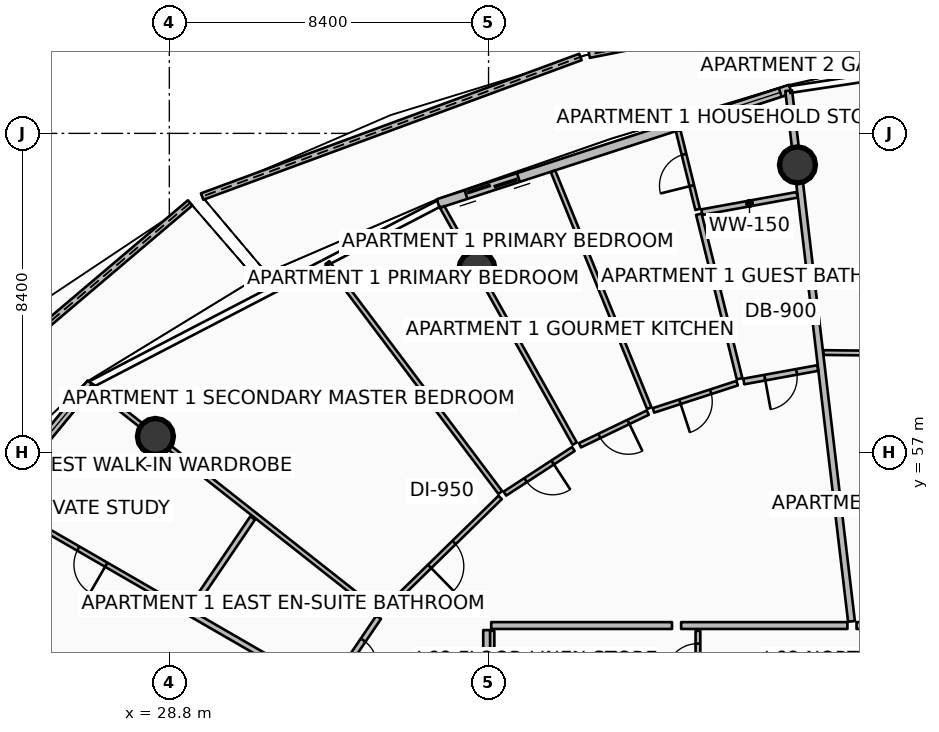
"""IFC4 building model, lengths in metres.
Left out: names, types, materials, properties, quantities, classifications, styles, units other than length and angle.
Written with IfcOpenShell. Run it as: python <this file> out.ifc"""

import sys

from ifc_helpers import new_model, si_unit, direction, frame, frame_2d, origin, origin_2d, place, context, subcontext, project, spatial, polyline, rectangle, circle, outline, extrude, element, fill, save


model = new_model("IFC4")
c1 = context("Model", 3, precision=1e-05, world=origin(), true_north=direction((0.0, 1.0)))
c2 = subcontext(c1, "Body", "Model", "MODEL_VIEW")
j1 = project(units=[si_unit("LENGTHUNIT", "METRE"), si_unit("PLANEANGLEUNIT", "RADIAN")], contexts=[c1])
p1 = place(None, origin())
s1 = spatial("IfcSite", under=j1, at=p1, CompositionType="ELEMENT")
p2 = place(p1, origin())
s2 = spatial("IfcBuilding", under=s1, at=p2, CompositionType="ELEMENT")
p3 = place(p2, frame((0.0, 0.0, 271.35)))
s3 = spatial("IfcBuildingStorey", under=s2, at=p3, CompositionType="ELEMENT", Elevation=271.35)
for number, where, z_axis, x_axis in (
    (1, (45.329, 64.571, 0.0), (0.0, 0.0, 1.0), (1.0, 0.0, 0.0)),
    (2, (36.895, 61.83, 0.0), (0.0, 0.0, 1.0), (1.0, 0.0, 0.0)),
    (3, (28.434, 57.425, 0.0), (0.0, 0.0, 1.0), (1.0, 0.0, 0.0)),
):
    element("IfcColumn", number, at=place(p3, frame(where, z_axis=z_axis, x_axis=x_axis)), inside=s3, PredefinedType="COLUMN", context=c2, shape_type="SweptSolid", body=[
        extrude(circle(Radius=0.475, at=origin_2d()), origin(), (0.0, 0.0, 1.0), 3.59),
    ])
p4 = place(p3, frame((49.994, 69.486, 0.0), z_axis=(0.0, 0.0, 1.0), x_axis=(-0.980919619001, -0.194413736807, 0.0)))
e4 = element("IfcWall", 4, at=p4, inside=s3, PredefinedType="PARAPET", context=c2, shape_type="SweptSolid", body=[
    extrude(outline(polyline([(0.0, 0.0), (10.344, 0.0), (10.344, 1.632), (5.172, 1.418), (0.0, 1.233), (0.0, 0.0)])), frame((0.0, 0.09, 0.0), z_axis=(0.0, -1.0, 0.0), x_axis=(1.0, 0.0, 0.0)), (0.0, 0.0, 1.0), 0.18),
])
p5 = place(p3, frame((39.618, 67.41, 0.0), z_axis=(0.0, 0.0, 1.0), x_axis=(-0.938191788678, -0.346115829828, 0.0)))
e5 = element("IfcWall", 5, at=p5, inside=s3, PredefinedType="PARAPET", context=c2, shape_type="SweptSolid", body=[
    extrude(outline(polyline([(0.0, 0.0), (10.611, 0.0), (10.611, 1.86), (5.305, 1.798), (0.0, 1.632), (0.0, 0.0)])), frame((0.0, 0.09, 0.0), z_axis=(0.0, -1.0, 0.0), x_axis=(1.0, 0.0, 0.0)), (0.0, 0.0, 1.0), 0.18),
])
p6 = place(p3, frame((29.348, 63.571, 0.0), z_axis=(0.0, 0.0, 1.0), x_axis=(-0.762735629532, -0.646710413896, 0.0)))
e6 = element("IfcWall", 6, at=p6, inside=s3, PredefinedType="PARAPET", context=c2, shape_type="SweptSolid", body=[
    extrude(outline(polyline([(0.0, 0.0), (11.535, 0.0), (11.535, 1.632), (5.768, 1.798), (0.0, 1.86), (0.0, 0.0)])), frame((0.0, 0.09, 0.0), z_axis=(0.0, -1.0, 0.0), x_axis=(1.0, 0.0, 0.0)), (0.0, 0.0, 1.0), 0.18),
])
p7 = place(p3, frame((45.142, 66.564, 0.0), z_axis=(0.0, 0.0, 1.0), x_axis=(-0.951055974609, -0.309018661507, 0.0)))
e7 = element("IfcWall", 7, at=p7, inside=s3, PredefinedType="SOLIDWALL", context=c2, shape_type="SweptSolid", body=[
    extrude(rectangle(XDim=9.745, YDim=0.24, at=frame_2d((4.873, 0.0))), origin(), (0.0, 0.0, 1.0), 2.54),
])
p8 = place(p7, frame((7.525, 0.0, 0.0)))
e8 = element("IfcOpeningElement", 8, at=p8, cuts=e7, PredefinedType="OPENING", context=c2, shape_type="SweptSolid", body=[
    extrude(rectangle(XDim=1.45, YDim=2.15, at=frame_2d((0.725, 1.075))), frame((0.0, 0.13, 0.0), z_axis=(0.0, -1.0, 0.0), x_axis=(1.0, 0.0, 0.0)), (0.0, 0.0, 1.0), 0.26),
])
p9 = place(p7, frame((0.28, 0.0, 0.65)))
e9 = element("IfcOpeningElement", 9, at=p9, cuts=e7, PredefinedType="OPENING", context=c2, shape_type="SweptSolid", body=[
    extrude(rectangle(XDim=1.6, YDim=1.5, at=frame_2d((0.8, 0.75))), frame((0.0, 0.13, 0.0), z_axis=(0.0, -1.0, 0.0), x_axis=(1.0, 0.0, 0.0)), (0.0, 0.0, 1.0), 0.26),
])
p10 = place(p3, frame((26.742, 58.822, 0.0), z_axis=(0.0, 0.0, 1.0), x_axis=(-0.636680093065, -0.771128043255, 0.0)))
e10 = element("IfcWall", 10, at=p10, inside=s3, PredefinedType="SOLIDWALL", context=c2, shape_type="SweptSolid", body=[
    extrude(rectangle(XDim=11.438, YDim=0.24, at=frame_2d((5.719, 0.0))), origin(), (0.0, 0.0, 1.0), 2.54),
])
p11 = place(p10, frame((9.218, 0.0, 0.0)))
e11 = element("IfcOpeningElement", 11, at=p11, cuts=e10, PredefinedType="OPENING", context=c2, shape_type="SweptSolid", body=[
    extrude(rectangle(XDim=1.45, YDim=2.15, at=frame_2d((0.725, 1.075))), frame((0.0, 0.13, 0.0), z_axis=(0.0, -1.0, 0.0), x_axis=(1.0, 0.0, 0.0)), (0.0, 0.0, 1.0), 0.26),
])
p12 = place(p10, frame((0.28, 0.0, 0.65)))
e12 = element("IfcOpeningElement", 12, at=p12, cuts=e10, PredefinedType="OPENING", context=c2, shape_type="SweptSolid", body=[
    extrude(rectangle(XDim=1.6, YDim=1.5, at=frame_2d((0.8, 0.75))), frame((0.0, 0.13, 0.0), z_axis=(0.0, -1.0, 0.0), x_axis=(1.0, 0.0, 0.0)), (0.0, 0.0, 1.0), 0.26),
])
p13 = place(p3, frame((37.29, 50.77, 0.0), z_axis=(0.0, 0.0, 1.0), x_axis=(0.0, 1.0, 0.0)))
e13 = element("IfcWall", 13, at=p13, inside=s3, PredefinedType="PARTITIONING", context=c2, shape_type="SweptSolid", body=[
    extrude(rectangle(XDim=1.54, YDim=0.125, at=frame_2d((0.77, 0.0))), origin(), (0.0, 0.0, 1.0), 3.03),
])
p14 = place(p3, frame((42.71, 50.79, 0.0), z_axis=(0.0, 0.0, 1.0), x_axis=(0.0, 1.0, 0.0)))
e14 = element("IfcWall", 14, at=p14, inside=s3, PredefinedType="PARTITIONING", context=c2, shape_type="SweptSolid", body=[
    extrude(rectangle(XDim=1.52, YDim=0.125, at=frame_2d((0.76, 0.0))), origin(), (0.0, 0.0, 1.0), 2.957),
])
p15 = place(p14, frame((0.335, 0.0, 0.0)))
e15 = element("IfcOpeningElement", 15, at=p15, cuts=e14, PredefinedType="OPENING", context=c2, shape_type="SweptSolid", body=[
    extrude(rectangle(XDim=0.85, YDim=2.06, at=frame_2d((0.425, 1.03))), frame((0.0, 0.073, 0.0), z_axis=(0.0, -1.0, 0.0), x_axis=(1.0, 0.0, 0.0)), (0.0, 0.0, 1.0), 0.145),
])
p16 = place(p3, frame((46.75, 52.559, 0.0), z_axis=(0.0, 0.0, 1.0), x_axis=(-0.117540318076, 0.993068111273, 0.0)))
e16 = element("IfcWall", 16, at=p16, inside=s3, PredefinedType="PARTITIONING", context=c2, shape_type="SweptSolid", body=[
    extrude(rectangle(XDim=14.062, YDim=0.18, at=frame_2d((7.031, 0.0))), origin(), (0.0, 0.0, 1.0), 2.957),
])
p17 = place(p3, frame((46.643, 52.45, 0.0), z_axis=(0.0, 0.0, 1.0), x_axis=(-1.0, 0.0, 0.0)))
e17 = element("IfcWall", 17, at=p17, inside=s3, PredefinedType="PARTITIONING", context=c2, shape_type="SweptSolid", body=[
    extrude(rectangle(XDim=4.376, YDim=0.18, at=frame_2d((2.188, 0.0))), origin(), (0.0, 0.0, 1.0), 2.957),
])
p18 = place(p3, frame((45.861, 59.226, 0.0), z_axis=(0.0, 0.0, 1.0), x_axis=(-0.983812554945, -0.179200604723, 0.0)))
e18 = element("IfcWall", 18, at=p18, inside=s3, PredefinedType="PARTITIONING", context=c2, shape_type="SweptSolid", body=[
    extrude(rectangle(XDim=1.977, YDim=0.15, at=frame_2d((0.988, 0.0))), origin(), (0.0, 0.0, 1.0), 2.957),
])
p19 = place(p18, frame((0.563, 0.0, 0.0)))
e19 = element("IfcOpeningElement", 19, at=p19, cuts=e18, PredefinedType="OPENING", context=c2, shape_type="SweptSolid", body=[
    extrude(rectangle(XDim=0.85, YDim=2.06, at=frame_2d((0.425, 1.03))), frame((0.0, 0.085, 0.0), z_axis=(0.0, -1.0, 0.0), x_axis=(1.0, 0.0, 0.0)), (0.0, 0.0, 1.0), 0.17),
])
p20 = place(p3, frame((45.321, 63.784, 0.0), z_axis=(0.0, 0.0, 1.0), x_axis=(-0.983788616277, -0.179331978422, 0.0)))
e20 = element("IfcWall", 20, at=p20, inside=s3, PredefinedType="PARTITIONING", context=c2, shape_type="SweptSolid", body=[
    extrude(rectangle(XDim=2.55, YDim=0.15, at=frame_2d((1.275, 0.0))), origin(), (0.0, 0.0, 1.0), 2.957),
])
p21 = place(p3, frame((43.806, 58.943, 0.0), z_axis=(0.0, 0.0, 1.0), x_axis=(-0.240319531841, 0.970693835674, 0.0)))
e21 = element("IfcWall", 21, at=p21, inside=s3, PredefinedType="PARTITIONING", context=c2, shape_type="SweptSolid", body=[
    extrude(rectangle(XDim=4.46, YDim=0.15, at=frame_2d((2.23, 0.0))), origin(), (0.0, 0.0, 1.0), 3.03),
])
p22 = place(p3, frame((42.703, 63.398, 0.0), z_axis=(0.0, 0.0, 1.0), x_axis=(-0.240385432392, 0.970677517971, 0.0)))
e22 = element("IfcWall", 22, at=p22, inside=s3, PredefinedType="PARTITIONING", context=c2, shape_type="SweptSolid", body=[
    extrude(rectangle(XDim=2.138, YDim=0.125, at=frame_2d((1.069, 0.0))), origin(), (0.0, 0.0, 1.0), 3.03),
])
p23 = place(p22, frame((0.644, 0.0, 0.0)))
e23 = element("IfcOpeningElement", 23, at=p23, cuts=e22, PredefinedType="OPENING", context=c2, shape_type="SweptSolid", body=[
    extrude(rectangle(XDim=0.85, YDim=2.06, at=frame_2d((0.425, 1.03))), frame((0.0, 0.073, 0.0), z_axis=(0.0, -1.0, 0.0), x_axis=(1.0, 0.0, 0.0)), (0.0, 0.0, 1.0), 0.145),
])
p24 = place(p3, frame((41.429, 58.17, 0.0), z_axis=(0.0, 0.0, 1.0), x_axis=(-0.376458801215, 0.926433360252, 0.0)))
e24 = element("IfcWall", 24, at=p24, inside=s3, PredefinedType="PARTITIONING", context=c2, shape_type="SweptSolid", body=[
    extrude(rectangle(XDim=6.728, YDim=0.125, at=frame_2d((3.364, 0.0))), origin(), (0.0, 0.0, 1.0), 3.03),
])
p25 = place(p3, frame((43.742, 58.827, 0.0), z_axis=(0.0, 0.0, 1.0), x_axis=(-0.950997650668, -0.309198105466, 0.0)))
e25 = element("IfcWall", 25, at=p25, inside=s3, PredefinedType="PARTITIONING", context=c2, shape_type="SweptSolid", body=[
    extrude(rectangle(XDim=2.316, YDim=0.125, at=frame_2d((1.158, 0.0))), origin(), (0.0, 0.0, 1.0), 3.03),
])
p26 = place(p25, frame((0.733, 0.0, 0.0)))
e26 = element("IfcOpeningElement", 26, at=p26, cuts=e25, PredefinedType="OPENING", context=c2, shape_type="SweptSolid", body=[
    extrude(rectangle(XDim=0.85, YDim=2.06, at=frame_2d((0.425, 1.03))), frame((0.0, 0.073, 0.0), z_axis=(0.0, -1.0, 0.0), x_axis=(1.0, 0.0, 0.0)), (0.0, 0.0, 1.0), 0.145),
])
p27 = place(p3, frame((41.391, 58.052, 0.0), z_axis=(0.0, 0.0, 1.0), x_axis=(-0.901197816095, -0.433408002079, 0.0)))
e27 = element("IfcWall", 27, at=p27, inside=s3, PredefinedType="PARTITIONING", context=c2, shape_type="SweptSolid", body=[
    extrude(rectangle(XDim=1.981, YDim=0.125, at=frame_2d((0.991, 0.0))), origin(), (0.0, 0.0, 1.0), 2.957),
])
p28 = place(p27, frame((0.565, 0.0, 0.0)))
e28 = element("IfcOpeningElement", 28, at=p28, cuts=e27, PredefinedType="OPENING", context=c2, shape_type="SweptSolid", body=[
    extrude(rectangle(XDim=0.85, YDim=2.06, at=frame_2d((0.425, 1.03))), frame((0.0, 0.073, 0.0), z_axis=(0.0, -1.0, 0.0), x_axis=(1.0, 0.0, 0.0)), (0.0, 0.0, 1.0), 0.145),
])
p29 = place(p3, frame((42.028, 52.45, 0.0), z_axis=(0.0, 0.0, 1.0), x_axis=(-1.0, 0.0, 0.0)))
e29 = element("IfcWall", 29, at=p29, inside=s3, PredefinedType="PARTITIONING", context=c2, shape_type="SweptSolid", body=[
    extrude(rectangle(XDim=4.758, YDim=0.18, at=frame_2d((2.379, 0.0))), origin(), (0.0, 0.0, 1.0), 2.957),
])
p30 = place(p3, frame((37.15, 52.33, 0.0), z_axis=(0.0, 0.0, 1.0), x_axis=(0.0, -1.0, 0.0)))
e30 = element("IfcWall", 30, at=p30, inside=s3, PredefinedType="PARTITIONING", context=c2, shape_type="SweptSolid", body=[
    extrude(rectangle(XDim=1.656, YDim=0.18, at=frame_2d((0.828, 0.0))), origin(), (0.0, 0.0, 1.0), 2.957),
])
p31 = place(p3, frame((39.467, 57.237, 0.0), z_axis=(0.0, 0.0, 1.0), x_axis=(-0.488642985948, 0.872483829239, 0.0)))
e31 = element("IfcWall", 31, at=p31, inside=s3, PredefinedType="PARTITIONING", context=c2, shape_type="SweptSolid", body=[
    extrude(rectangle(XDim=7.131, YDim=0.125, at=frame_2d((3.565, 0.0))), origin(), (0.0, 0.0, 1.0), 2.957),
])
p32 = place(p3, frame((37.509, 55.949, 0.0), z_axis=(0.0, 0.0, 1.0), x_axis=(-0.60104674722, 0.799213868534, 0.0)))
e32 = element("IfcWall", 32, at=p32, inside=s3, PredefinedType="PARTITIONING", context=c2, shape_type="SweptSolid", body=[
    extrude(rectangle(XDim=7.572, YDim=0.125, at=frame_2d((3.786, 0.0))), origin(), (0.0, 0.0, 1.0), 3.03),
])
p33 = place(p3, frame((39.432, 57.095, 0.0), z_axis=(0.0, 0.0, 1.0), x_axis=(-0.837734795217, -0.546077295703, 0.0)))
e33 = element("IfcWall", 33, at=p33, inside=s3, PredefinedType="PARTITIONING", context=c2, shape_type="SweptSolid", body=[
    extrude(rectangle(XDim=2.15, YDim=0.125, at=frame_2d((1.075, 0.0))), origin(), (0.0, 0.0, 1.0), 2.957),
])
p34 = place(p33, frame((0.65, 0.0, 0.0)))
e34 = element("IfcOpeningElement", 34, at=p34, cuts=e33, PredefinedType="OPENING", context=c2, shape_type="SweptSolid", body=[
    extrude(rectangle(XDim=0.85, YDim=2.06, at=frame_2d((0.425, 1.03))), frame((0.0, 0.073, 0.0), z_axis=(0.0, -1.0, 0.0), x_axis=(1.0, 0.0, 0.0)), (0.0, 0.0, 1.0), 0.145),
])
p35 = place(p3, frame((37.506, 55.822, 0.0), z_axis=(0.0, 0.0, 1.0), x_axis=(-0.715105814901, -0.699016218334, 0.0)))
e35 = element("IfcWall", 35, at=p35, inside=s3, PredefinedType="PARTITIONING", context=c2, shape_type="SweptSolid", body=[
    extrude(rectangle(XDim=4.294, YDim=0.125, at=frame_2d((2.147, 0.0))), origin(), (0.0, 0.0, 1.0), 2.957),
])
p36 = place(p35, frame((1.697, 0.0, 0.0)))
e36 = element("IfcOpeningElement", 36, at=p36, cuts=e35, PredefinedType="OPENING", context=c2, shape_type="SweptSolid", body=[
    extrude(rectangle(XDim=0.9, YDim=2.08, at=frame_2d((0.45, 1.04))), frame((0.0, 0.073, 0.0), z_axis=(0.0, -1.0, 0.0), x_axis=(1.0, 0.0, 0.0)), (0.0, 0.0, 1.0), 0.145),
])
p37 = place(p3, frame((34.285, 52.812, 0.0), z_axis=(0.0, 0.0, 1.0), x_axis=(-0.785324921183, 0.619083813526, 0.0)))
e37 = element("IfcWall", 37, at=p37, inside=s3, PredefinedType="PARTITIONING", context=c2, shape_type="SweptSolid", body=[
    extrude(rectangle(XDim=9.621, YDim=0.125, at=frame_2d((4.811, 0.0))), origin(), (0.0, 0.0, 1.0), 2.957),
])
p38 = place(p3, frame((34.308, 52.667, 0.0), z_axis=(0.0, 0.0, 1.0), x_axis=(-0.561141072409, -0.827720180288, 0.0)))
e38 = element("IfcWall", 38, at=p38, inside=s3, PredefinedType="PARTITIONING", context=c2, shape_type="SweptSolid", body=[
    extrude(rectangle(XDim=2.303, YDim=0.15, at=frame_2d((1.152, 0.0))), origin(), (0.0, 0.0, 1.0), 2.957),
])
p39 = place(p38, frame((0.727, 0.0, 0.0)))
e39 = element("IfcOpeningElement", 39, at=p39, cuts=e38, PredefinedType="OPENING", context=c2, shape_type="SweptSolid", body=[
    extrude(rectangle(XDim=0.85, YDim=2.06, at=frame_2d((0.425, 1.03))), frame((0.0, 0.085, 0.0), z_axis=(0.0, -1.0, 0.0), x_axis=(1.0, 0.0, 0.0)), (0.0, 0.0, 1.0), 0.17),
])
p40 = place(p3, frame((30.994, 55.28, 0.0), z_axis=(0.0, 0.0, 1.0), x_axis=(-0.561093021969, -0.827752753361, 0.0)))
e40 = element("IfcWall", 40, at=p40, inside=s3, PredefinedType="PARTITIONING", context=c2, shape_type="SweptSolid", body=[
    extrude(rectangle(XDim=2.91, YDim=0.15, at=frame_2d((1.455, 0.0))), origin(), (0.0, 0.0, 1.0), 2.957),
])
p41 = place(p3, frame((32.887, 50.731, 0.0), z_axis=(0.0, 0.0, 1.0), x_axis=(-0.865897249189, 0.500221904605, 0.0)))
e41 = element("IfcWall", 41, at=p41, inside=s3, PredefinedType="PARTITIONING", context=c2, shape_type="SweptSolid", body=[
    extrude(rectangle(XDim=4.09, YDim=0.15, at=frame_2d((2.045, 0.0))), origin(), (0.0, 0.0, 1.0), 3.03),
])
p42 = place(p3, frame((29.233, 52.842, 0.0), z_axis=(0.0, 0.0, 1.0), x_axis=(-0.865885749935, 0.500241809588, 0.0)))
e42 = element("IfcWall", 42, at=p42, inside=s3, PredefinedType="PARTITIONING", context=c2, shape_type="SweptSolid", body=[
    extrude(rectangle(XDim=5.683, YDim=0.125, at=frame_2d((2.841, 0.0))), origin(), (0.0, 0.0, 1.0), 3.03),
])
p43 = place(p42, frame((2.417, 0.0, 0.0)))
e43 = element("IfcOpeningElement", 43, at=p43, cuts=e42, PredefinedType="OPENING", context=c2, shape_type="SweptSolid", body=[
    extrude(rectangle(XDim=0.85, YDim=2.06, at=frame_2d((0.425, 1.03))), frame((0.0, 0.073, 0.0), z_axis=(0.0, -1.0, 0.0), x_axis=(1.0, 0.0, 0.0)), (0.0, 0.0, 1.0), 0.145),
])
p44 = place(p3, frame((31.92, 48.787, 0.0), z_axis=(0.0, 0.0, 1.0), x_axis=(-0.92130726737, 0.388835336731, 0.0)))
e44 = element("IfcWall", 44, at=p44, inside=s3, PredefinedType="PARTITIONING", context=c2, shape_type="SweptSolid", body=[
    extrude(rectangle(XDim=10.712, YDim=0.125, at=frame_2d((5.356, 0.0))), origin(), (0.0, 0.0, 1.0), 3.03),
])
p45 = place(p3, frame((50.827, 52.45, 0.0), z_axis=(0.0, 0.0, 1.0), x_axis=(-1.0, 0.0, 0.0)))
e45 = element("IfcWall", 45, at=p45, inside=s3, PredefinedType="PARTITIONING", context=c2, shape_type="SweptSolid", body=[
    extrude(rectangle(XDim=3.944, YDim=0.18, at=frame_2d((1.972, 0.0))), origin(), (0.0, 0.0, 1.0), 2.957),
])
p46 = place(p3, frame((50.408, 59.583, 0.0), z_axis=(0.0, 0.0, 1.0), x_axis=(-0.999935174521, 0.01138625289, 0.0)))
e46 = element("IfcWall", 46, at=p46, inside=s3, PredefinedType="PARTITIONING", context=c2, shape_type="SweptSolid", body=[
    extrude(rectangle(XDim=4.396, YDim=0.125, at=frame_2d((2.198, 0.0))), origin(), (0.0, 0.0, 1.0), 3.03),
])
p47 = place(p46, frame((1.748, 0.0, 0.0)))
e47 = element("IfcOpeningElement", 47, at=p47, cuts=e46, PredefinedType="OPENING", context=c2, shape_type="SweptSolid", body=[
    extrude(rectangle(XDim=0.9, YDim=2.08, at=frame_2d((0.45, 1.04))), frame((0.0, 0.073, 0.0), z_axis=(0.0, -1.0, 0.0), x_axis=(1.0, 0.0, 0.0)), (0.0, 0.0, 1.0), 0.145),
])
p48 = place(p8, origin())
e48 = element("IfcDoor", 48, at=p48, inside=s3, OperationType="DOUBLE_DOOR_SLIDING", PredefinedType="DOOR", context=c2, shape_type="SweptSolid", body=[
    extrude(rectangle(XDim=1.45, YDim=2.15, at=frame_2d((0.725, 1.075))), frame((0.0, 0.025, 0.0), z_axis=(0.0, -1.0, 0.0), x_axis=(1.0, 0.0, 0.0)), (0.0, 0.0, 1.0), 0.05),
])
fill(e8, e48)
p49 = place(p9, origin())
e49 = element("IfcWindow", 49, at=p49, inside=s3, PartitioningType="SINGLE_PANEL", PredefinedType="WINDOW", context=c2, shape_type="SweptSolid", body=[
    extrude(rectangle(XDim=1.6, YDim=1.5, at=frame_2d((0.8, 0.75))), frame((0.0, 0.03, 0.0), z_axis=(0.0, -1.0, 0.0), x_axis=(1.0, 0.0, 0.0)), (0.0, 0.0, 1.0), 0.06),
])
fill(e9, e49)
p50 = place(p12, origin())
e50 = element("IfcWindow", 50, at=p50, inside=s3, PartitioningType="SINGLE_PANEL", PredefinedType="WINDOW", context=c2, shape_type="SweptSolid", body=[
    extrude(rectangle(XDim=1.6, YDim=1.5, at=frame_2d((0.8, 0.75))), frame((0.0, 0.03, 0.0), z_axis=(0.0, -1.0, 0.0), x_axis=(1.0, 0.0, 0.0)), (0.0, 0.0, 1.0), 0.06),
])
fill(e12, e50)
p51 = place(p15, origin())
e51 = element("IfcDoor", 51, at=p51, inside=s3, OperationType="SINGLE_SWING_LEFT", PredefinedType="DOOR", context=c2, shape_type="SweptSolid", body=[
    extrude(rectangle(XDim=0.85, YDim=2.06, at=frame_2d((0.425, 1.03))), frame((0.0, 0.025, 0.0), z_axis=(0.0, -1.0, 0.0), x_axis=(1.0, 0.0, 0.0)), (0.0, 0.0, 1.0), 0.05),
])
fill(e15, e51)
p52 = place(p19, origin())
e52 = element("IfcDoor", 52, at=p52, inside=s3, OperationType="SINGLE_SWING_RIGHT", PredefinedType="DOOR", context=c2, shape_type="SweptSolid", body=[
    extrude(rectangle(XDim=0.85, YDim=2.06, at=frame_2d((0.425, 1.03))), frame((0.0, 0.025, 0.0), z_axis=(0.0, -1.0, 0.0), x_axis=(1.0, 0.0, 0.0)), (0.0, 0.0, 1.0), 0.05),
])
fill(e19, e52)
p53 = place(p23, origin())
e53 = element("IfcDoor", 53, at=p53, inside=s3, OperationType="SINGLE_SWING_LEFT", PredefinedType="DOOR", context=c2, shape_type="SweptSolid", body=[
    extrude(rectangle(XDim=0.85, YDim=2.06, at=frame_2d((0.425, 1.03))), frame((0.0, 0.025, 0.0), z_axis=(0.0, -1.0, 0.0), x_axis=(1.0, 0.0, 0.0)), (0.0, 0.0, 1.0), 0.05),
])
fill(e23, e53)
p54 = place(p26, origin())
e54 = element("IfcDoor", 54, at=p54, inside=s3, OperationType="SINGLE_SWING_RIGHT", PredefinedType="DOOR", context=c2, shape_type="SweptSolid", body=[
    extrude(rectangle(XDim=0.85, YDim=2.06, at=frame_2d((0.425, 1.03))), frame((0.0, 0.025, 0.0), z_axis=(0.0, -1.0, 0.0), x_axis=(1.0, 0.0, 0.0)), (0.0, 0.0, 1.0), 0.05),
])
fill(e26, e54)
p55 = place(p28, origin())
e55 = element("IfcDoor", 55, at=p55, inside=s3, OperationType="SINGLE_SWING_LEFT", PredefinedType="DOOR", context=c2, shape_type="SweptSolid", body=[
    extrude(rectangle(XDim=0.85, YDim=2.06, at=frame_2d((0.425, 1.03))), frame((0.0, 0.025, 0.0), z_axis=(0.0, -1.0, 0.0), x_axis=(1.0, 0.0, 0.0)), (0.0, 0.0, 1.0), 0.05),
])
fill(e28, e55)
p56 = place(p34, origin())
e56 = element("IfcDoor", 56, at=p56, inside=s3, OperationType="SINGLE_SWING_LEFT", PredefinedType="DOOR", context=c2, shape_type="SweptSolid", body=[
    extrude(rectangle(XDim=0.85, YDim=2.06, at=frame_2d((0.425, 1.03))), frame((0.0, 0.025, 0.0), z_axis=(0.0, -1.0, 0.0), x_axis=(1.0, 0.0, 0.0)), (0.0, 0.0, 1.0), 0.05),
])
fill(e34, e56)
p57 = place(p36, origin())
e57 = element("IfcDoor", 57, at=p57, inside=s3, OperationType="SINGLE_SWING_RIGHT", PredefinedType="DOOR", context=c2, shape_type="SweptSolid", body=[
    extrude(rectangle(XDim=0.9, YDim=2.08, at=frame_2d((0.45, 1.04))), frame((0.0, 0.025, 0.0), z_axis=(0.0, -1.0, 0.0), x_axis=(1.0, 0.0, 0.0)), (0.0, 0.0, 1.0), 0.05),
])
fill(e36, e57)
p58 = place(p39, origin())
e58 = element("IfcDoor", 58, at=p58, inside=s3, OperationType="SINGLE_SWING_RIGHT", PredefinedType="DOOR", context=c2, shape_type="SweptSolid", body=[
    extrude(rectangle(XDim=0.85, YDim=2.06, at=frame_2d((0.425, 1.03))), frame((0.0, 0.025, 0.0), z_axis=(0.0, -1.0, 0.0), x_axis=(1.0, 0.0, 0.0)), (0.0, 0.0, 1.0), 0.05),
])
fill(e39, e58)
p59 = place(p43, origin())
e59 = element("IfcDoor", 59, at=p59, inside=s3, OperationType="SINGLE_SWING_LEFT", PredefinedType="DOOR", context=c2, shape_type="SweptSolid", body=[
    extrude(rectangle(XDim=0.85, YDim=2.06, at=frame_2d((0.425, 1.03))), frame((0.0, 0.025, 0.0), z_axis=(0.0, -1.0, 0.0), x_axis=(1.0, 0.0, 0.0)), (0.0, 0.0, 1.0), 0.05),
])
fill(e43, e59)
save(model, sys.argv[1])
